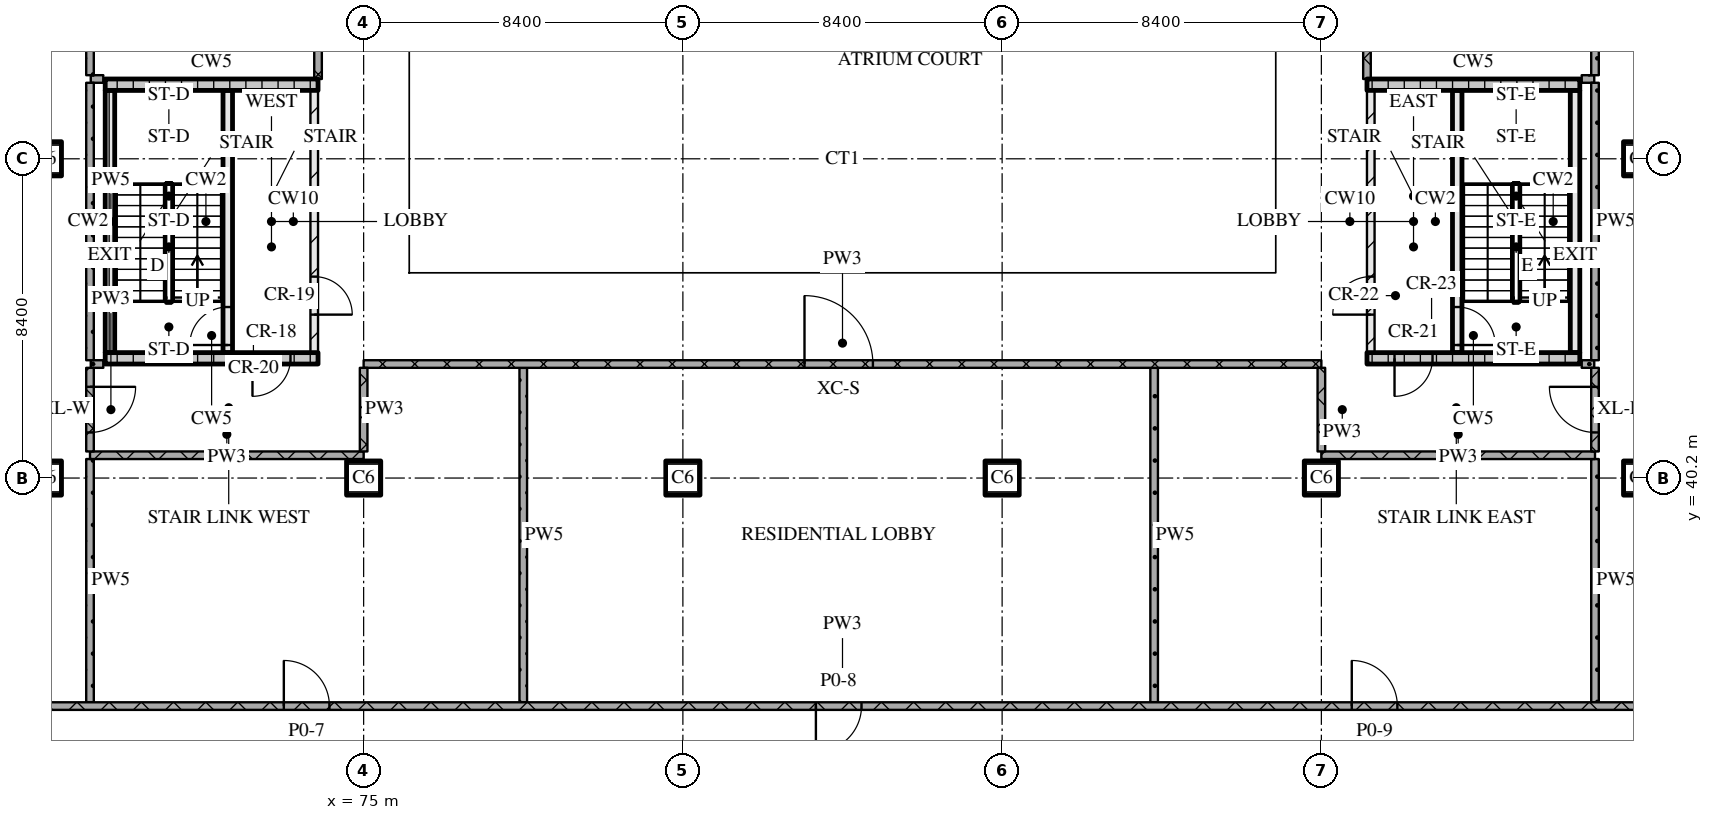
"""IFC4 building model, lengths in metres.
Left out: names, types, materials, properties, quantities, classifications, styles, units other than length and angle.
Written with IfcOpenShell. Run it as: python <this file> out.ifc"""

import sys

from ifc_helpers import new_model, si_unit, direction, frame, frame_2d, origin, origin_2d, place, context, subcontext, project, spatial, rectangle, extrude, element, fill, save


model = new_model("IFC4")
c1 = context("Model", 3, precision=1e-05, world=origin(), true_north=direction((0.0, 1.0)))
c2 = subcontext(c1, "Body", "Model", "MODEL_VIEW")
j1 = project(units=[si_unit("LENGTHUNIT", "METRE"), si_unit("PLANEANGLEUNIT", "RADIAN")], contexts=[c1])
p1 = place(None, origin())
s1 = spatial("IfcSite", under=j1, at=p1, CompositionType="ELEMENT")
p2 = place(p1, origin())
s2 = spatial("IfcBuilding", under=s1, at=p2, CompositionType="ELEMENT")
p3 = place(p2, origin())
s3 = spatial("IfcBuildingStorey", under=s2, at=p3, CompositionType="ELEMENT", Elevation=0.0)
for number, where, z_axis, x_axis in (
    (1, (66.6, 40.2, 0.0), (0.0, 0.0, 1.0), (1.0, 0.0, 0.0)),
    (2, (66.6, 48.6, 0.0), (0.0, 0.0, 1.0), (1.0, 0.0, 0.0)),
    (3, (75.0, 40.2, 0.0), (0.0, 0.0, 1.0), (1.0, 0.0, 0.0)),
    (4, (83.4, 40.2, 0.0), (0.0, 0.0, 1.0), (1.0, 0.0, 0.0)),
    (5, (91.8, 40.2, 0.0), (0.0, 0.0, 1.0), (1.0, 0.0, 0.0)),
    (6, (100.2, 40.2, 0.0), (0.0, 0.0, 1.0), (1.0, 0.0, 0.0)),
    (7, (108.6, 40.2, 0.0), (0.0, 0.0, 1.0), (1.0, 0.0, 0.0)),
    (8, (108.6, 48.6, 0.0), (0.0, 0.0, 1.0), (1.0, 0.0, 0.0)),
):
    element("IfcColumn", number, at=place(p3, frame(where, z_axis=z_axis, x_axis=x_axis)), inside=s3, PredefinedType="COLUMN", context=c2, shape_type="SweptSolid", body=[
        extrude(rectangle(XDim=0.9, YDim=0.9, at=origin_2d()), origin(), (0.0, 0.0, 1.0), 9.0),
    ])
p4 = place(p3, frame((68.2, 43.35, 0.0), z_axis=(0.0, 0.0, 1.0), x_axis=(1.0, 0.0, 0.0)))
e9 = element("IfcWall", 9, at=p4, inside=s3, PredefinedType="SOLIDWALL", context=c2, shape_type="SweptSolid", body=[
    extrude(rectangle(XDim=5.6, YDim=0.3, at=frame_2d((2.8, 0.0))), origin(), (0.0, 0.0, 1.0), 8.7),
])
p5 = place(p4, frame((3.875, 0.0, 0.0)))
e10 = element("IfcOpeningElement", 10, at=p5, cuts=e9, PredefinedType="OPENING", context=c2, shape_type="SweptSolid", body=[
    extrude(rectangle(XDim=1.0, YDim=2.1, at=frame_2d((0.5, 1.05))), frame((0.0, 0.16, 0.0), z_axis=(0.0, -1.0, 0.0), x_axis=(1.0, 0.0, 0.0)), (0.0, 0.0, 1.0), 0.32),
])
p6 = place(p3, frame((68.325, 43.5, 0.0), z_axis=(0.0, 0.0, 1.0), x_axis=(0.0, 1.0, 0.0)))
e11 = element("IfcWall", 11, at=p6, inside=s3, PredefinedType="SOLIDWALL", context=c2, shape_type="SweptSolid", body=[
    extrude(rectangle(XDim=6.9, YDim=0.25, at=frame_2d((3.45, 0.0))), origin(), (0.0, 0.0, 1.0), 8.7),
])
p7 = place(p3, frame((71.425, 43.5, 0.0), z_axis=(0.0, 0.0, 1.0), x_axis=(0.0, 1.0, 0.0)))
e12 = element("IfcWall", 12, at=p7, inside=s3, PredefinedType="SOLIDWALL", context=c2, shape_type="SweptSolid", body=[
    extrude(rectangle(XDim=6.9, YDim=0.25, at=frame_2d((3.45, 0.0))), origin(), (0.0, 0.0, 1.0), 8.7),
])
p8 = place(p7, frame((0.2, 0.0, 0.0)))
e13 = element("IfcOpeningElement", 13, at=p8, cuts=e12, PredefinedType="OPENING", context=c2, shape_type="SweptSolid", body=[
    extrude(rectangle(XDim=1.0, YDim=2.1, at=frame_2d((0.5, 1.05))), frame((0.0, 0.135, 0.0), z_axis=(0.0, -1.0, 0.0), x_axis=(1.0, 0.0, 0.0)), (0.0, 0.0, 1.0), 0.27),
])
p9 = place(p3, frame((73.7, 43.5, 0.0), z_axis=(0.0, 0.0, 1.0), x_axis=(0.0, 1.0, 0.0)))
e14 = element("IfcWall", 14, at=p9, inside=s3, PredefinedType="PARTITIONING", context=c2, shape_type="SweptSolid", body=[
    extrude(rectangle(XDim=6.9, YDim=0.2, at=frame_2d((3.45, 0.0))), origin(), (0.0, 0.0, 1.0), 8.7),
])
p10 = place(p9, frame((1.0, 0.0, 0.0)))
e15 = element("IfcOpeningElement", 15, at=p10, cuts=e14, PredefinedType="OPENING", context=c2, shape_type="SweptSolid", body=[
    extrude(rectangle(XDim=1.0, YDim=2.1, at=frame_2d((0.5, 1.05))), frame((0.0, 0.11, 0.0), z_axis=(0.0, -1.0, 0.0), x_axis=(1.0, 0.0, 0.0)), (0.0, 0.0, 1.0), 0.22),
])
p11 = place(p3, frame((68.2, 50.55, 0.0), z_axis=(0.0, 0.0, 1.0), x_axis=(1.0, 0.0, 0.0)))
e16 = element("IfcWall", 16, at=p11, inside=s3, PredefinedType="SOLIDWALL", context=c2, shape_type="SweptSolid", body=[
    extrude(rectangle(XDim=5.6, YDim=0.3, at=frame_2d((2.8, 0.0))), origin(), (0.0, 0.0, 1.0), 8.7),
])
p12 = place(p3, frame((101.4, 43.35, 0.0), z_axis=(0.0, 0.0, 1.0), x_axis=(1.0, 0.0, 0.0)))
e17 = element("IfcWall", 17, at=p12, inside=s3, PredefinedType="SOLIDWALL", context=c2, shape_type="SweptSolid", body=[
    extrude(rectangle(XDim=5.6, YDim=0.3, at=frame_2d((2.8, 0.0))), origin(), (0.0, 0.0, 1.0), 8.7),
])
p13 = place(p12, frame((0.725, 0.0, 0.0)))
e18 = element("IfcOpeningElement", 18, at=p13, cuts=e17, PredefinedType="OPENING", context=c2, shape_type="SweptSolid", body=[
    extrude(rectangle(XDim=1.0, YDim=2.1, at=frame_2d((0.5, 1.05))), frame((0.0, 0.16, 0.0), z_axis=(0.0, -1.0, 0.0), x_axis=(1.0, 0.0, 0.0)), (0.0, 0.0, 1.0), 0.32),
])
p14 = place(p3, frame((101.5, 43.5, 0.0), z_axis=(0.0, 0.0, 1.0), x_axis=(0.0, 1.0, 0.0)))
e19 = element("IfcWall", 19, at=p14, inside=s3, PredefinedType="PARTITIONING", context=c2, shape_type="SweptSolid", body=[
    extrude(rectangle(XDim=6.9, YDim=0.2, at=frame_2d((3.45, 0.0))), origin(), (0.0, 0.0, 1.0), 8.7),
])
p15 = place(p14, frame((1.0, 0.0, 0.0)))
e20 = element("IfcOpeningElement", 20, at=p15, cuts=e19, PredefinedType="OPENING", context=c2, shape_type="SweptSolid", body=[
    extrude(rectangle(XDim=1.0, YDim=2.1, at=frame_2d((0.5, 1.05))), frame((0.0, 0.11, 0.0), z_axis=(0.0, -1.0, 0.0), x_axis=(1.0, 0.0, 0.0)), (0.0, 0.0, 1.0), 0.22),
])
p16 = place(p3, frame((103.775, 43.5, 0.0), z_axis=(0.0, 0.0, 1.0), x_axis=(0.0, 1.0, 0.0)))
e21 = element("IfcWall", 21, at=p16, inside=s3, PredefinedType="SOLIDWALL", context=c2, shape_type="SweptSolid", body=[
    extrude(rectangle(XDim=6.9, YDim=0.25, at=frame_2d((3.45, 0.0))), origin(), (0.0, 0.0, 1.0), 8.7),
])
p17 = place(p16, frame((0.2, 0.0, 0.0)))
e22 = element("IfcOpeningElement", 22, at=p17, cuts=e21, PredefinedType="OPENING", context=c2, shape_type="SweptSolid", body=[
    extrude(rectangle(XDim=1.0, YDim=2.1, at=frame_2d((0.5, 1.05))), frame((0.0, 0.135, 0.0), z_axis=(0.0, -1.0, 0.0), x_axis=(1.0, 0.0, 0.0)), (0.0, 0.0, 1.0), 0.27),
])
p18 = place(p3, frame((106.875, 43.5, 0.0), z_axis=(0.0, 0.0, 1.0), x_axis=(0.0, 1.0, 0.0)))
e23 = element("IfcWall", 23, at=p18, inside=s3, PredefinedType="SOLIDWALL", context=c2, shape_type="SweptSolid", body=[
    extrude(rectangle(XDim=6.9, YDim=0.25, at=frame_2d((3.45, 0.0))), origin(), (0.0, 0.0, 1.0), 8.7),
])
p19 = place(p3, frame((101.4, 50.55, 0.0), z_axis=(0.0, 0.0, 1.0), x_axis=(1.0, 0.0, 0.0)))
e24 = element("IfcWall", 24, at=p19, inside=s3, PredefinedType="SOLIDWALL", context=c2, shape_type="SweptSolid", body=[
    extrude(rectangle(XDim=5.6, YDim=0.3, at=frame_2d((2.8, 0.0))), origin(), (0.0, 0.0, 1.0), 8.7),
])
p20 = place(p3, frame((45.4, 34.2, 0.0), z_axis=(0.0, 0.0, 1.0), x_axis=(1.0, 0.0, 0.0)))
e25 = element("IfcWall", 25, at=p20, inside=s3, PredefinedType="PARTITIONING", context=c2, shape_type="SweptSolid", body=[
    extrude(rectangle(XDim=84.4, YDim=0.2, at=frame_2d((42.2, 0.0))), origin(), (0.0, 0.0, 1.0), 8.7),
])
p21 = place(p20, frame((27.5, 0.0, 0.0)))
e26 = element("IfcOpeningElement", 26, at=p21, cuts=e25, PredefinedType="OPENING", context=c2, shape_type="SweptSolid", body=[
    extrude(rectangle(XDim=1.2, YDim=2.1, at=frame_2d((0.6, 1.05))), frame((0.0, 0.11, 0.0), z_axis=(0.0, -1.0, 0.0), x_axis=(1.0, 0.0, 0.0)), (0.0, 0.0, 1.0), 0.22),
])
p22 = place(p20, frame((41.5, 0.0, 0.0)))
e27 = element("IfcOpeningElement", 27, at=p22, cuts=e25, PredefinedType="OPENING", context=c2, shape_type="SweptSolid", body=[
    extrude(rectangle(XDim=1.2, YDim=2.1, at=frame_2d((0.6, 1.05))), frame((0.0, 0.11, 0.0), z_axis=(0.0, -1.0, 0.0), x_axis=(1.0, 0.0, 0.0)), (0.0, 0.0, 1.0), 0.22),
])
p23 = place(p20, frame((55.6, 0.0, 0.0)))
e28 = element("IfcOpeningElement", 28, at=p23, cuts=e25, PredefinedType="OPENING", context=c2, shape_type="SweptSolid", body=[
    extrude(rectangle(XDim=1.2, YDim=2.1, at=frame_2d((0.6, 1.05))), frame((0.0, 0.11, 0.0), z_axis=(0.0, -1.0, 0.0), x_axis=(1.0, 0.0, 0.0)), (0.0, 0.0, 1.0), 0.22),
])
p24 = place(p20, frame((72.75, 0.0, 0.0)))
e29 = element("IfcOpeningElement", 29, at=p24, cuts=e25, PredefinedType="OPENING", context=c2, shape_type="SweptSolid", body=[
    extrude(rectangle(XDim=1.2, YDim=2.1, at=frame_2d((0.6, 1.05))), frame((0.0, 0.11, 0.0), z_axis=(0.0, -1.0, 0.0), x_axis=(1.0, 0.0, 0.0)), (0.0, 0.0, 1.0), 0.22),
])
for number, where, z_axis, x_axis in (
    (30, (67.8, 40.8, 0.0), (0.0, 0.0, 1.0), (1.0, 0.0, 0.0)),
    (31, (100.2, 40.8, 0.0), (0.0, 0.0, 1.0), (1.0, 0.0, 0.0)),
):
    element("IfcWall", number, at=place(p3, frame(where, z_axis=z_axis, x_axis=x_axis)), inside=s3, PredefinedType="PARTITIONING", context=c2, shape_type="SweptSolid", body=[
        extrude(rectangle(XDim=7.2, YDim=0.2, at=frame_2d((3.6, 0.0))), origin(), (0.0, 0.0, 1.0), 8.7),
    ])
p25 = place(p3, frame((75.0, 43.2, 0.0), z_axis=(0.0, 0.0, 1.0), x_axis=(1.0, 0.0, 0.0)))
e32 = element("IfcWall", 32, at=p25, inside=s3, PredefinedType="PARTITIONING", context=c2, shape_type="SweptSolid", body=[
    extrude(rectangle(XDim=25.2, YDim=0.2, at=frame_2d((12.6, 0.0))), origin(), (0.0, 0.0, 1.0), 8.7),
])
p26 = place(p25, frame((11.6, 0.0, 0.0)))
e33 = element("IfcOpeningElement", 33, at=p26, cuts=e32, PredefinedType="OPENING", context=c2, shape_type="SweptSolid", body=[
    extrude(rectangle(XDim=1.8, YDim=2.1, at=frame_2d((0.9, 1.05))), frame((0.0, 0.11, 0.0), z_axis=(0.0, -1.0, 0.0), x_axis=(1.0, 0.0, 0.0)), (0.0, 0.0, 1.0), 0.22),
])
for number, where, z_axis, x_axis in (
    (34, (67.82, 43.2, 0.0), (0.0, 0.0, 1.0), (1.0, 0.0, 0.0)),
    (35, (107.05, 43.2, 0.0), (0.0, 0.0, 1.0), (1.0, 0.0, 0.0)),
    (36, (67.82, 50.7, 0.0), (0.0, 0.0, 1.0), (1.0, 0.0, 0.0)),
    (37, (107.05, 50.7, 0.0), (0.0, 0.0, 1.0), (1.0, 0.0, 0.0)),
):
    element("IfcWall", number, at=place(p3, frame(where, z_axis=z_axis, x_axis=x_axis)), inside=s3, PredefinedType="PARTITIONING", context=c2, shape_type="SweptSolid", body=[
        extrude(rectangle(XDim=0.33, YDim=0.2, at=frame_2d((0.165, 0.0))), origin(), (0.0, 0.0, 1.0), 8.7),
    ])
p27 = place(p3, frame((67.8, 43.1, 0.0), z_axis=(0.0, 0.0, 1.0), x_axis=(0.0, -1.0, 0.0)))
e38 = element("IfcWall", 38, at=p27, inside=s3, PredefinedType="PARTITIONING", context=c2, shape_type="SweptSolid", body=[
    extrude(rectangle(XDim=2.2, YDim=0.2, at=frame_2d((1.1, 0.0))), origin(), (0.0, 0.0, 1.0), 8.7),
])
p28 = place(p27, frame((0.5, 0.0, 0.0)))
e39 = element("IfcOpeningElement", 39, at=p28, cuts=e38, PredefinedType="OPENING", context=c2, shape_type="SweptSolid", body=[
    extrude(rectangle(XDim=1.2, YDim=2.1, at=frame_2d((0.6, 1.05))), frame((0.0, 0.11, 0.0), z_axis=(0.0, -1.0, 0.0), x_axis=(1.0, 0.0, 0.0)), (0.0, 0.0, 1.0), 0.22),
])
p29 = place(p3, frame((67.8, 50.6, 0.0), z_axis=(0.0, 0.0, 1.0), x_axis=(0.0, -1.0, 0.0)))
e40 = element("IfcWall", 40, at=p29, inside=s3, PredefinedType="PARTITIONING", context=c2, shape_type="SweptSolid", body=[
    extrude(rectangle(XDim=7.3, YDim=0.2, at=frame_2d((3.65, 0.0))), origin(), (0.0, 0.0, 1.0), 8.7),
])
p30 = place(p3, frame((67.8, 40.7, 0.0), z_axis=(0.0, 0.0, 1.0), x_axis=(0.0, -1.0, 0.0)))
e41 = element("IfcWall", 41, at=p30, inside=s3, PredefinedType="PARTITIONING", context=c2, shape_type="SweptSolid", body=[
    extrude(rectangle(XDim=6.4, YDim=0.2, at=frame_2d((3.2, 0.0))), origin(), (0.0, 0.0, 1.0), 8.7),
])
p31 = place(p3, frame((67.8, 58.7, 0.0), z_axis=(0.0, 0.0, 1.0), x_axis=(0.0, -1.0, 0.0)))
e42 = element("IfcWall", 42, at=p31, inside=s3, PredefinedType="PARTITIONING", context=c2, shape_type="SweptSolid", body=[
    extrude(rectangle(XDim=7.9, YDim=0.2, at=frame_2d((3.95, 0.0))), origin(), (0.0, 0.0, 1.0), 8.7),
])
p32 = place(p3, frame((73.8, 50.7, 0.0), z_axis=(0.0, 0.0, 1.0), x_axis=(0.0, 1.0, 0.0)))
e43 = element("IfcWall", 43, at=p32, inside=s3, PredefinedType="PARTITIONING", context=c2, shape_type="SweptSolid", body=[
    extrude(rectangle(XDim=8.0, YDim=0.2, at=frame_2d((4.0, 0.0))), origin(), (0.0, 0.0, 1.0), 8.7),
])
p33 = place(p32, frame((3.5, 0.0, 0.0)))
e44 = element("IfcOpeningElement", 44, at=p33, cuts=e43, PredefinedType="OPENING", context=c2, shape_type="SweptSolid", body=[
    extrude(rectangle(XDim=1.0, YDim=2.1, at=frame_2d((0.5, 1.05))), frame((0.0, 0.11, 0.0), z_axis=(0.0, -1.0, 0.0), x_axis=(1.0, 0.0, 0.0)), (0.0, 0.0, 1.0), 0.22),
])
p34 = place(p3, frame((75.0, 43.1, 0.0), z_axis=(0.0, 0.0, 1.0), x_axis=(0.0, -1.0, 0.0)))
e45 = element("IfcWall", 45, at=p34, inside=s3, PredefinedType="PARTITIONING", context=c2, shape_type="SweptSolid", body=[
    extrude(rectangle(XDim=2.2, YDim=0.2, at=frame_2d((1.1, 0.0))), origin(), (0.0, 0.0, 1.0), 7.8),
])
for number, where, z_axis, x_axis in (
    (46, (79.2, 43.1, 0.0), (0.0, 0.0, 1.0), (0.0, -1.0, 0.0)),
    (47, (95.8, 43.1, 0.0), (0.0, 0.0, 1.0), (0.0, -1.0, 0.0)),
):
    element("IfcWall", number, at=place(p3, frame(where, z_axis=z_axis, x_axis=x_axis)), inside=s3, PredefinedType="PARTITIONING", context=c2, shape_type="SweptSolid", body=[
        extrude(rectangle(XDim=8.8, YDim=0.2, at=frame_2d((4.4, 0.0))), origin(), (0.0, 0.0, 1.0), 8.7),
    ])
p35 = place(p3, frame((100.2, 43.1, 0.0), z_axis=(0.0, 0.0, 1.0), x_axis=(0.0, -1.0, 0.0)))
e48 = element("IfcWall", 48, at=p35, inside=s3, PredefinedType="PARTITIONING", context=c2, shape_type="SweptSolid", body=[
    extrude(rectangle(XDim=2.2, YDim=0.2, at=frame_2d((1.1, 0.0))), origin(), (0.0, 0.0, 1.0), 7.8),
])
p36 = place(p3, frame((101.4, 53.6, 0.0), z_axis=(0.0, 0.0, 1.0), x_axis=(0.0, -1.0, 0.0)))
e49 = element("IfcWall", 49, at=p36, inside=s3, PredefinedType="PARTITIONING", context=c2, shape_type="SweptSolid", body=[
    extrude(rectangle(XDim=2.9, YDim=0.2, at=frame_2d((1.45, 0.0))), origin(), (0.0, 0.0, 1.0), 8.7),
])
p37 = place(p36, frame((0.95, 0.0, 0.0)))
e50 = element("IfcOpeningElement", 50, at=p37, cuts=e49, PredefinedType="OPENING", context=c2, shape_type="SweptSolid", body=[
    extrude(rectangle(XDim=1.0, YDim=2.1, at=frame_2d((0.5, 1.05))), frame((0.0, 0.11, 0.0), z_axis=(0.0, -1.0, 0.0), x_axis=(1.0, 0.0, 0.0)), (0.0, 0.0, 1.0), 0.22),
])
p38 = place(p3, frame((107.4, 43.1, 0.0), z_axis=(0.0, 0.0, 1.0), x_axis=(0.0, -1.0, 0.0)))
e51 = element("IfcWall", 51, at=p38, inside=s3, PredefinedType="PARTITIONING", context=c2, shape_type="SweptSolid", body=[
    extrude(rectangle(XDim=2.2, YDim=0.2, at=frame_2d((1.1, 0.0))), origin(), (0.0, 0.0, 1.0), 8.7),
])
p39 = place(p38, frame((0.5, 0.0, 0.0)))
e52 = element("IfcOpeningElement", 52, at=p39, cuts=e51, PredefinedType="OPENING", context=c2, shape_type="SweptSolid", body=[
    extrude(rectangle(XDim=1.2, YDim=2.1, at=frame_2d((0.6, 1.05))), frame((0.0, 0.11, 0.0), z_axis=(0.0, -1.0, 0.0), x_axis=(1.0, 0.0, 0.0)), (0.0, 0.0, 1.0), 0.22),
])
p40 = place(p3, frame((107.4, 50.6, 0.0), z_axis=(0.0, 0.0, 1.0), x_axis=(0.0, -1.0, 0.0)))
e53 = element("IfcWall", 53, at=p40, inside=s3, PredefinedType="PARTITIONING", context=c2, shape_type="SweptSolid", body=[
    extrude(rectangle(XDim=7.3, YDim=0.2, at=frame_2d((3.65, 0.0))), origin(), (0.0, 0.0, 1.0), 8.7),
])
p41 = place(p3, frame((107.4, 40.7, 0.0), z_axis=(0.0, 0.0, 1.0), x_axis=(0.0, -1.0, 0.0)))
e54 = element("IfcWall", 54, at=p41, inside=s3, PredefinedType="PARTITIONING", context=c2, shape_type="SweptSolid", body=[
    extrude(rectangle(XDim=6.4, YDim=0.2, at=frame_2d((3.2, 0.0))), origin(), (0.0, 0.0, 1.0), 8.7),
])
p42 = place(p3, frame((107.4, 53.6, 0.0), z_axis=(0.0, 0.0, 1.0), x_axis=(0.0, -1.0, 0.0)))
e55 = element("IfcWall", 55, at=p42, inside=s3, PredefinedType="PARTITIONING", context=c2, shape_type="SweptSolid", body=[
    extrude(rectangle(XDim=2.8, YDim=0.2, at=frame_2d((1.4, 0.0))), origin(), (0.0, 0.0, 1.0), 8.7),
])
p43 = place(p5, origin())
e56 = element("IfcDoor", 56, at=p43, inside=s3, OperationType="SINGLE_SWING_RIGHT", PredefinedType="DOOR", context=c2, shape_type="SweptSolid", body=[
    extrude(rectangle(XDim=1.0, YDim=2.1, at=frame_2d((0.5, 1.05))), frame((0.0, 0.025, 0.0), z_axis=(0.0, -1.0, 0.0), x_axis=(1.0, 0.0, 0.0)), (0.0, 0.0, 1.0), 0.05),
])
fill(e10, e56)
p44 = place(p8, origin())
e57 = element("IfcDoor", 57, at=p44, inside=s3, OperationType="SINGLE_SWING_LEFT", PredefinedType="DOOR", context=c2, shape_type="SweptSolid", body=[
    extrude(rectangle(XDim=1.0, YDim=2.1, at=frame_2d((0.5, 1.05))), frame((0.0, 0.025, 0.0), z_axis=(0.0, -1.0, 0.0), x_axis=(1.0, 0.0, 0.0)), (0.0, 0.0, 1.0), 0.05),
])
fill(e13, e57)
p45 = place(p10, origin())
e58 = element("IfcDoor", 58, at=p45, inside=s3, OperationType="SINGLE_SWING_RIGHT", PredefinedType="DOOR", context=c2, shape_type="SweptSolid", body=[
    extrude(rectangle(XDim=1.0, YDim=2.1, at=frame_2d((0.5, 1.05))), frame((0.0, 0.025, 0.0), z_axis=(0.0, -1.0, 0.0), x_axis=(1.0, 0.0, 0.0)), (0.0, 0.0, 1.0), 0.05),
])
fill(e15, e58)
p46 = place(p13, origin())
e59 = element("IfcDoor", 59, at=p46, inside=s3, OperationType="SINGLE_SWING_RIGHT", PredefinedType="DOOR", context=c2, shape_type="SweptSolid", body=[
    extrude(rectangle(XDim=1.0, YDim=2.1, at=frame_2d((0.5, 1.05))), frame((0.0, 0.025, 0.0), z_axis=(0.0, -1.0, 0.0), x_axis=(1.0, 0.0, 0.0)), (0.0, 0.0, 1.0), 0.05),
])
fill(e18, e59)
p47 = place(p17, origin())
e60 = element("IfcDoor", 60, at=p47, inside=s3, OperationType="SINGLE_SWING_RIGHT", PredefinedType="DOOR", context=c2, shape_type="SweptSolid", body=[
    extrude(rectangle(XDim=1.0, YDim=2.1, at=frame_2d((0.5, 1.05))), frame((0.0, 0.025, 0.0), z_axis=(0.0, -1.0, 0.0), x_axis=(1.0, 0.0, 0.0)), (0.0, 0.0, 1.0), 0.05),
])
fill(e22, e60)
p48 = place(p15, origin())
e61 = element("IfcDoor", 61, at=p48, inside=s3, OperationType="SINGLE_SWING_LEFT", PredefinedType="DOOR", context=c2, shape_type="SweptSolid", body=[
    extrude(rectangle(XDim=1.0, YDim=2.1, at=frame_2d((0.5, 1.05))), frame((0.0, 0.025, 0.0), z_axis=(0.0, -1.0, 0.0), x_axis=(1.0, 0.0, 0.0)), (0.0, 0.0, 1.0), 0.05),
])
fill(e20, e61)
p49 = place(p21, origin())
e62 = element("IfcDoor", 62, at=p49, inside=s3, OperationType="SINGLE_SWING_LEFT", PredefinedType="DOOR", context=c2, shape_type="SweptSolid", body=[
    extrude(rectangle(XDim=1.2, YDim=2.1, at=frame_2d((0.6, 1.05))), frame((0.0, 0.025, 0.0), z_axis=(0.0, -1.0, 0.0), x_axis=(1.0, 0.0, 0.0)), (0.0, 0.0, 1.0), 0.05),
])
fill(e26, e62)
p50 = place(p22, origin())
e63 = element("IfcDoor", 63, at=p50, inside=s3, OperationType="SINGLE_SWING_RIGHT", PredefinedType="DOOR", context=c2, shape_type="SweptSolid", body=[
    extrude(rectangle(XDim=1.2, YDim=2.1, at=frame_2d((0.6, 1.05))), frame((0.0, 0.025, 0.0), z_axis=(0.0, -1.0, 0.0), x_axis=(1.0, 0.0, 0.0)), (0.0, 0.0, 1.0), 0.05),
])
fill(e27, e63)
p51 = place(p23, origin())
e64 = element("IfcDoor", 64, at=p51, inside=s3, OperationType="SINGLE_SWING_LEFT", PredefinedType="DOOR", context=c2, shape_type="SweptSolid", body=[
    extrude(rectangle(XDim=1.2, YDim=2.1, at=frame_2d((0.6, 1.05))), frame((0.0, 0.025, 0.0), z_axis=(0.0, -1.0, 0.0), x_axis=(1.0, 0.0, 0.0)), (0.0, 0.0, 1.0), 0.05),
])
fill(e28, e64)
p52 = place(p28, origin())
e65 = element("IfcDoor", 65, at=p52, inside=s3, OperationType="SINGLE_SWING_LEFT", PredefinedType="DOOR", context=c2, shape_type="SweptSolid", body=[
    extrude(rectangle(XDim=1.2, YDim=2.1, at=frame_2d((0.6, 1.05))), frame((0.0, 0.025, 0.0), z_axis=(0.0, -1.0, 0.0), x_axis=(1.0, 0.0, 0.0)), (0.0, 0.0, 1.0), 0.05),
])
fill(e39, e65)
p53 = place(p39, origin())
e66 = element("IfcDoor", 66, at=p53, inside=s3, OperationType="SINGLE_SWING_RIGHT", PredefinedType="DOOR", context=c2, shape_type="SweptSolid", body=[
    extrude(rectangle(XDim=1.2, YDim=2.1, at=frame_2d((0.6, 1.05))), frame((0.0, 0.025, 0.0), z_axis=(0.0, -1.0, 0.0), x_axis=(1.0, 0.0, 0.0)), (0.0, 0.0, 1.0), 0.05),
])
fill(e52, e66)
p54 = place(p26, origin())
e67 = element("IfcDoor", 67, at=p54, inside=s3, OperationType="DOUBLE_DOOR_SINGLE_SWING", PredefinedType="DOOR", context=c2, shape_type="SweptSolid", body=[
    extrude(rectangle(XDim=1.8, YDim=2.1, at=frame_2d((0.9, 1.05))), frame((0.0, 0.025, 0.0), z_axis=(0.0, -1.0, 0.0), x_axis=(1.0, 0.0, 0.0)), (0.0, 0.0, 1.0), 0.05),
])
fill(e33, e67)
save(model, sys.argv[1])
